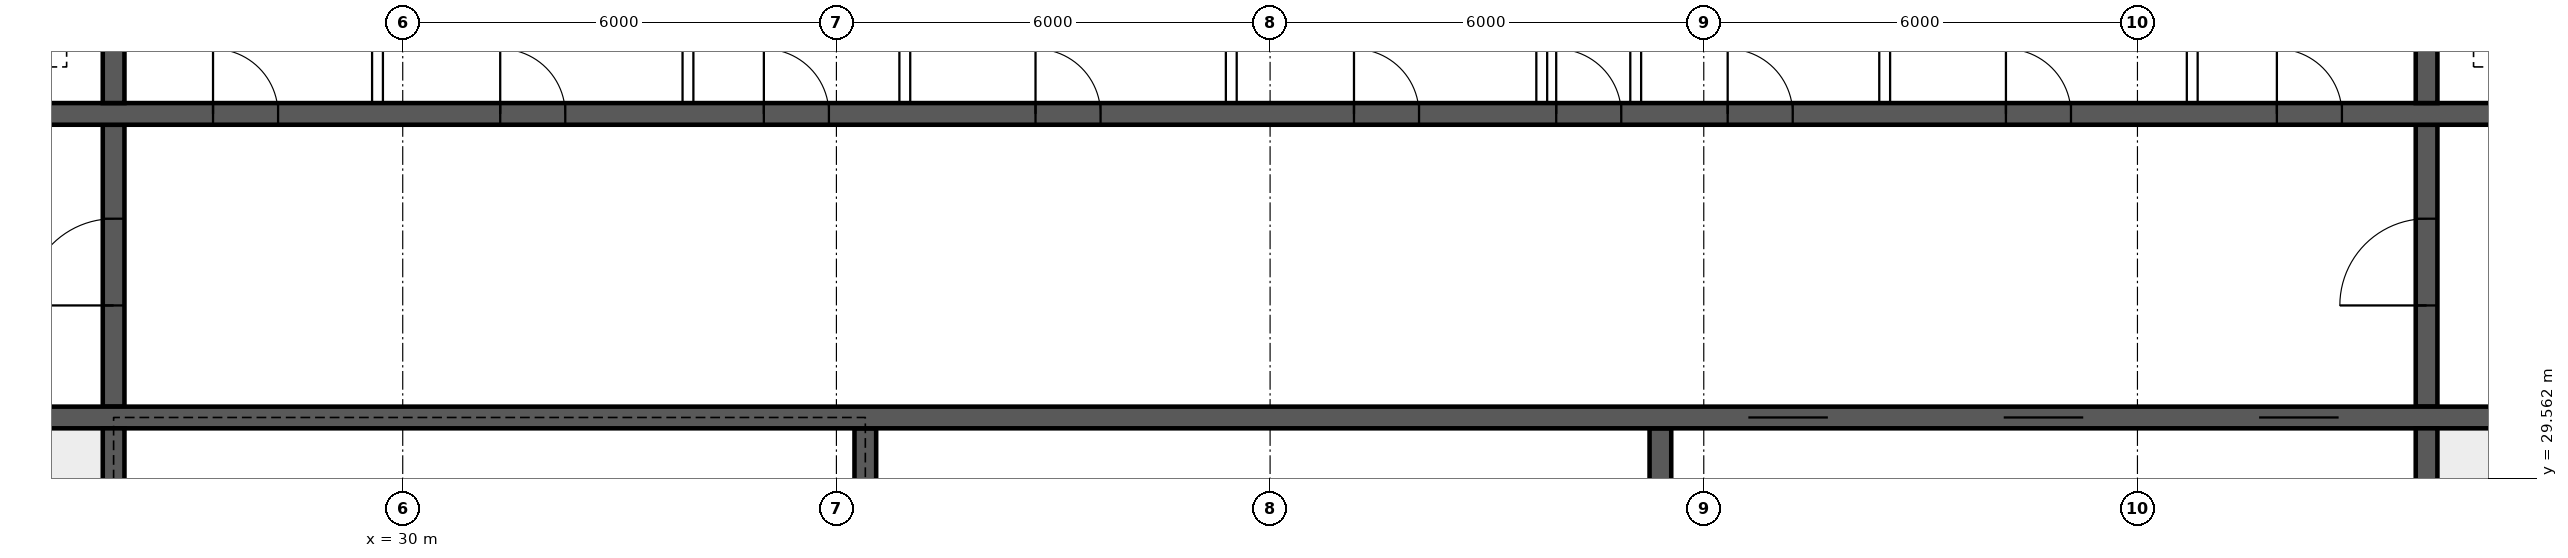
"""IFC4 building model, lengths in metres.
Left out: names, types, materials, properties, quantities, classifications, styles, units other than length and angle.
Written with IfcOpenShell. Run it as: python <this file> out.ifc"""

import sys

from ifc_helpers import new_model, si_unit, direction, frame, frame_2d, origin, place, context, subcontext, project, spatial, rectangle, extrude, element, fill, save


model = new_model("IFC4")
c1 = context("Model", 3, precision=1e-05, world=origin(), true_north=direction((0.0, 1.0)))
c2 = subcontext(c1, "Body", "Model", "MODEL_VIEW")
j1 = project(units=[si_unit("LENGTHUNIT", "METRE"), si_unit("PLANEANGLEUNIT", "RADIAN")], contexts=[c1])
p1 = place(None, origin())
s1 = spatial("IfcSite", under=j1, at=p1, CompositionType="ELEMENT")
p2 = place(p1, origin())
s2 = spatial("IfcBuilding", under=s1, at=p2, CompositionType="ELEMENT")
p3 = place(p2, frame((0.0, 0.0, 68.95)))
s3 = spatial("IfcBuildingStorey", under=s2, at=p3, CompositionType="ELEMENT", Elevation=68.95)
p4 = place(p3, frame((18.5, 30.4, 0.0), z_axis=(0.0, 0.0, 1.0), x_axis=(1.0, 0.0, 0.0)))
e1 = element("IfcWall", 1, at=p4, inside=s3, PredefinedType="SHEAR", context=c2, shape_type="SweptSolid", body=[
    extrude(rectangle(XDim=47.0, YDim=0.3, at=frame_2d((23.5, 0.0))), origin(), (0.0, 0.0, 1.0), 7.2),
])
p5 = place(p4, frame((0.4, 0.0, 0.0)))
e2 = element("IfcOpeningElement", 2, at=p5, cuts=e1, PredefinedType="OPENING", context=c2, shape_type="SweptSolid", body=[
    extrude(rectangle(XDim=1.0, YDim=2.1, at=frame_2d((0.5, 1.05))), frame((0.0, 0.16, 0.0), z_axis=(0.0, -1.0, 0.0), x_axis=(1.0, 0.0, 0.0)), (0.0, 0.0, 1.0), 0.32),
])
p6 = place(p4, frame((45.6, 0.0, 0.0)))
e3 = element("IfcOpeningElement", 3, at=p6, cuts=e1, PredefinedType="OPENING", context=c2, shape_type="SweptSolid", body=[
    extrude(rectangle(XDim=1.0, YDim=2.1, at=frame_2d((0.5, 1.05))), frame((0.0, 0.16, 0.0), z_axis=(0.0, -1.0, 0.0), x_axis=(1.0, 0.0, 0.0)), (0.0, 0.0, 1.0), 0.32),
])
p7 = place(p4, frame((30.117, 0.0, 0.0)))
e4 = element("IfcOpeningElement", 4, at=p7, cuts=e1, PredefinedType="OPENING", context=c2, shape_type="SweptSolid", body=[
    extrude(rectangle(XDim=1.1, YDim=2.1, at=frame_2d((0.55, 1.05))), frame((0.0, 0.16, 0.0), z_axis=(0.0, -1.0, 0.0), x_axis=(1.0, 0.0, 0.0)), (0.0, 0.0, 1.0), 0.32),
])
p8 = place(p4, frame((33.65, 0.0, 0.0)))
e5 = element("IfcOpeningElement", 5, at=p8, cuts=e1, PredefinedType="OPENING", context=c2, shape_type="SweptSolid", body=[
    extrude(rectangle(XDim=1.1, YDim=2.1, at=frame_2d((0.55, 1.05))), frame((0.0, 0.16, 0.0), z_axis=(0.0, -1.0, 0.0), x_axis=(1.0, 0.0, 0.0)), (0.0, 0.0, 1.0), 0.32),
])
p9 = place(p4, frame((37.183, 0.0, 0.0)))
e6 = element("IfcOpeningElement", 6, at=p9, cuts=e1, PredefinedType="OPENING", context=c2, shape_type="SweptSolid", body=[
    extrude(rectangle(XDim=1.1, YDim=2.1, at=frame_2d((0.55, 1.05))), frame((0.0, 0.16, 0.0), z_axis=(0.0, -1.0, 0.0), x_axis=(1.0, 0.0, 0.0)), (0.0, 0.0, 1.0), 0.32),
])
p10 = place(p3, frame((18.5, 34.6, 0.0), z_axis=(0.0, 0.0, 1.0), x_axis=(1.0, 0.0, 0.0)))
e7 = element("IfcWall", 7, at=p10, inside=s3, PredefinedType="SHEAR", context=c2, shape_type="SweptSolid", body=[
    extrude(rectangle(XDim=47.0, YDim=0.3, at=frame_2d((23.5, 0.0))), origin(), (0.0, 0.0, 1.0), 7.2),
])
p11 = place(p10, frame((0.9, 0.0, 0.0)))
e8 = element("IfcOpeningElement", 8, at=p11, cuts=e7, PredefinedType="OPENING", context=c2, shape_type="SweptSolid", body=[
    extrude(rectangle(XDim=1.1, YDim=2.1, at=frame_2d((0.55, 1.05))), frame((0.0, 0.16, 0.0), z_axis=(0.0, -1.0, 0.0), x_axis=(1.0, 0.0, 0.0)), (0.0, 0.0, 1.0), 0.32),
])
p12 = place(p10, frame((45.0, 0.0, 0.0)))
e9 = element("IfcOpeningElement", 9, at=p12, cuts=e7, PredefinedType="OPENING", context=c2, shape_type="SweptSolid", body=[
    extrude(rectangle(XDim=1.1, YDim=2.1, at=frame_2d((0.55, 1.05))), frame((0.0, 0.16, 0.0), z_axis=(0.0, -1.0, 0.0), x_axis=(1.0, 0.0, 0.0)), (0.0, 0.0, 1.0), 0.32),
])
p13 = place(p10, frame((4.1, 0.0, 0.0)))
e10 = element("IfcOpeningElement", 10, at=p13, cuts=e7, PredefinedType="OPENING", context=c2, shape_type="SweptSolid", body=[
    extrude(rectangle(XDim=0.9, YDim=2.1, at=frame_2d((0.45, 1.05))), frame((0.0, 0.16, 0.0), z_axis=(0.0, -1.0, 0.0), x_axis=(1.0, 0.0, 0.0)), (0.0, 0.0, 1.0), 0.32),
])
p14 = place(p10, frame((42.0, 0.0, 0.0)))
e11 = element("IfcOpeningElement", 11, at=p14, cuts=e7, PredefinedType="OPENING", context=c2, shape_type="SweptSolid", body=[
    extrude(rectangle(XDim=0.9, YDim=2.1, at=frame_2d((0.45, 1.05))), frame((0.0, 0.16, 0.0), z_axis=(0.0, -1.0, 0.0), x_axis=(1.0, 0.0, 0.0)), (0.0, 0.0, 1.0), 0.32),
])
p15 = place(p10, frame((8.875, 0.0, 0.0)))
e12 = element("IfcOpeningElement", 12, at=p15, cuts=e7, PredefinedType="OPENING", context=c2, shape_type="SweptSolid", body=[
    extrude(rectangle(XDim=0.9, YDim=2.1, at=frame_2d((0.45, 1.05))), frame((0.0, 0.16, 0.0), z_axis=(0.0, -1.0, 0.0), x_axis=(1.0, 0.0, 0.0)), (0.0, 0.0, 1.0), 0.32),
])
p16 = place(p10, frame((12.849, 0.0, 0.0)))
e13 = element("IfcOpeningElement", 13, at=p16, cuts=e7, PredefinedType="OPENING", context=c2, shape_type="SweptSolid", body=[
    extrude(rectangle(XDim=0.9, YDim=2.1, at=frame_2d((0.45, 1.05))), frame((0.0, 0.16, 0.0), z_axis=(0.0, -1.0, 0.0), x_axis=(1.0, 0.0, 0.0)), (0.0, 0.0, 1.0), 0.32),
])
p17 = place(p10, frame((16.496, 0.0, 0.0)))
e14 = element("IfcOpeningElement", 14, at=p17, cuts=e7, PredefinedType="OPENING", context=c2, shape_type="SweptSolid", body=[
    extrude(rectangle(XDim=0.9, YDim=2.1, at=frame_2d((0.45, 1.05))), frame((0.0, 0.16, 0.0), z_axis=(0.0, -1.0, 0.0), x_axis=(1.0, 0.0, 0.0)), (0.0, 0.0, 1.0), 0.32),
])
p18 = place(p10, frame((20.255, 0.0, 0.0)))
e15 = element("IfcOpeningElement", 15, at=p18, cuts=e7, PredefinedType="OPENING", context=c2, shape_type="SweptSolid", body=[
    extrude(rectangle(XDim=0.9, YDim=2.1, at=frame_2d((0.45, 1.05))), frame((0.0, 0.16, 0.0), z_axis=(0.0, -1.0, 0.0), x_axis=(1.0, 0.0, 0.0)), (0.0, 0.0, 1.0), 0.32),
])
p19 = place(p10, frame((24.661, 0.0, 0.0)))
e16 = element("IfcOpeningElement", 16, at=p19, cuts=e7, PredefinedType="OPENING", context=c2, shape_type="SweptSolid", body=[
    extrude(rectangle(XDim=0.9, YDim=2.1, at=frame_2d((0.45, 1.05))), frame((0.0, 0.16, 0.0), z_axis=(0.0, -1.0, 0.0), x_axis=(1.0, 0.0, 0.0)), (0.0, 0.0, 1.0), 0.32),
])
p20 = place(p10, frame((27.458, 0.0, 0.0)))
e17 = element("IfcOpeningElement", 17, at=p20, cuts=e7, PredefinedType="OPENING", context=c2, shape_type="SweptSolid", body=[
    extrude(rectangle(XDim=0.9, YDim=2.1, at=frame_2d((0.45, 1.05))), frame((0.0, 0.16, 0.0), z_axis=(0.0, -1.0, 0.0), x_axis=(1.0, 0.0, 0.0)), (0.0, 0.0, 1.0), 0.32),
])
p21 = place(p10, frame((29.831, 0.0, 0.0)))
e18 = element("IfcOpeningElement", 18, at=p21, cuts=e7, PredefinedType="OPENING", context=c2, shape_type="SweptSolid", body=[
    extrude(rectangle(XDim=0.9, YDim=2.1, at=frame_2d((0.45, 1.05))), frame((0.0, 0.16, 0.0), z_axis=(0.0, -1.0, 0.0), x_axis=(1.0, 0.0, 0.0)), (0.0, 0.0, 1.0), 0.32),
])
p22 = place(p10, frame((33.68, 0.0, 0.0)))
e19 = element("IfcOpeningElement", 19, at=p22, cuts=e7, PredefinedType="OPENING", context=c2, shape_type="SweptSolid", body=[
    extrude(rectangle(XDim=0.9, YDim=2.1, at=frame_2d((0.45, 1.05))), frame((0.0, 0.16, 0.0), z_axis=(0.0, -1.0, 0.0), x_axis=(1.0, 0.0, 0.0)), (0.0, 0.0, 1.0), 0.32),
])
p23 = place(p10, frame((37.429, 0.0, 0.0)))
e20 = element("IfcOpeningElement", 20, at=p23, cuts=e7, PredefinedType="OPENING", context=c2, shape_type="SweptSolid", body=[
    extrude(rectangle(XDim=0.9, YDim=2.1, at=frame_2d((0.45, 1.05))), frame((0.0, 0.16, 0.0), z_axis=(0.0, -1.0, 0.0), x_axis=(1.0, 0.0, 0.0)), (0.0, 0.0, 1.0), 0.32),
])
for number, where, z_axis, x_axis in (
    (21, (26.0, 26.3, 0.0), (0.0, 0.0, 1.0), (0.0, 1.0, 0.0)),
    (22, (58.0, 26.3, 0.0), (0.0, 0.0, 1.0), (0.0, 1.0, 0.0)),
):
    element("IfcWall", number, at=place(p3, frame(where, z_axis=z_axis, x_axis=x_axis)), inside=s3, PredefinedType="SHEAR", context=c2, shape_type="SweptSolid", body=[
        extrude(rectangle(XDim=3.95, YDim=0.3, at=frame_2d((1.975, 0.0))), origin(), (0.0, 0.0, 1.0), 7.2),
    ])
p24 = place(p3, frame((26.0, 30.55, 0.0), z_axis=(0.0, 0.0, 1.0), x_axis=(0.0, 1.0, 0.0)))
e23 = element("IfcWall", 23, at=p24, inside=s3, PredefinedType="SHEAR", context=c2, shape_type="SweptSolid", body=[
    extrude(rectangle(XDim=3.9, YDim=0.3, at=frame_2d((1.95, 0.0))), origin(), (0.0, 0.0, 1.0), 7.2),
])
p25 = place(p24, frame((1.4, 0.0, 0.0)))
e24 = element("IfcOpeningElement", 24, at=p25, cuts=e23, PredefinedType="OPENING", context=c2, shape_type="SweptSolid", body=[
    extrude(rectangle(XDim=1.2, YDim=2.1, at=frame_2d((0.6, 1.05))), frame((0.0, 0.16, 0.0), z_axis=(0.0, -1.0, 0.0), x_axis=(1.0, 0.0, 0.0)), (0.0, 0.0, 1.0), 0.32),
])
p26 = place(p3, frame((58.0, 30.55, 0.0), z_axis=(0.0, 0.0, 1.0), x_axis=(0.0, 1.0, 0.0)))
e25 = element("IfcWall", 25, at=p26, inside=s3, PredefinedType="SHEAR", context=c2, shape_type="SweptSolid", body=[
    extrude(rectangle(XDim=3.9, YDim=0.3, at=frame_2d((1.95, 0.0))), origin(), (0.0, 0.0, 1.0), 7.2),
])
p27 = place(p26, frame((1.4, 0.0, 0.0)))
e26 = element("IfcOpeningElement", 26, at=p27, cuts=e25, PredefinedType="OPENING", context=c2, shape_type="SweptSolid", body=[
    extrude(rectangle(XDim=1.2, YDim=2.1, at=frame_2d((0.6, 1.05))), frame((0.0, 0.16, 0.0), z_axis=(0.0, -1.0, 0.0), x_axis=(1.0, 0.0, 0.0)), (0.0, 0.0, 1.0), 0.32),
])
for number, where, z_axis, x_axis in (
    (27, (26.0, 34.75, 0.0), (0.0, 0.0, 1.0), (0.0, 1.0, 0.0)),
    (28, (58.0, 34.75, 0.0), (0.0, 0.0, 1.0), (0.0, 1.0, 0.0)),
):
    element("IfcWall", number, at=place(p3, frame(where, z_axis=z_axis, x_axis=x_axis)), inside=s3, PredefinedType="SHEAR", context=c2, shape_type="SweptSolid", body=[
        extrude(rectangle(XDim=2.95, YDim=0.3, at=frame_2d((1.475, 0.0))), origin(), (0.0, 0.0, 1.0), 7.2),
    ])
for number, where, z_axis, x_axis in (
    (29, (36.4, 26.3, 0.0), (0.0, 0.0, 1.0), (0.0, 1.0, 0.0)),
    (30, (47.4, 26.3, 0.0), (0.0, 0.0, 1.0), (0.0, 1.0, 0.0)),
):
    element("IfcWall", number, at=place(p3, frame(where, z_axis=z_axis, x_axis=x_axis)), inside=s3, PredefinedType="SHEAR", context=c2, shape_type="SweptSolid", body=[
        extrude(rectangle(XDim=3.95, YDim=0.3, at=frame_2d((1.975, 0.0))), origin(), (0.0, 0.0, 1.0), 7.2),
    ])
for number, where, z_axis, x_axis in (
    (31, (29.651, 34.75, 0.0), (0.0, 0.0, 1.0), (0.0, 1.0, 0.0)),
    (32, (33.946, 34.75, 0.0), (0.0, 0.0, 1.0), (0.0, 1.0, 0.0)),
    (33, (36.946, 34.75, 0.0), (0.0, 0.0, 1.0), (0.0, 1.0, 0.0)),
    (34, (41.463, 34.75, 0.0), (0.0, 0.0, 1.0), (0.0, 1.0, 0.0)),
    (35, (45.758, 34.75, 0.0), (0.0, 0.0, 1.0), (0.0, 1.0, 0.0)),
    (36, (47.058, 34.75, 0.0), (0.0, 0.0, 1.0), (0.0, 1.0, 0.0)),
    (37, (50.503, 34.75, 0.0), (0.0, 0.0, 1.0), (0.0, 1.0, 0.0)),
    (38, (54.758, 34.75, 0.0), (0.0, 0.0, 1.0), (0.0, 1.0, 0.0)),
):
    element("IfcWall", number, at=place(p3, frame(where, z_axis=z_axis, x_axis=x_axis)), inside=s3, PredefinedType="SOLIDWALL", context=c2, shape_type="SweptSolid", body=[
        extrude(rectangle(XDim=2.95, YDim=0.15, at=frame_2d((1.475, 0.0))), origin(), (0.0, 0.0, 1.0), 6.9),
    ])
p28 = place(p25, origin())
e39 = element("IfcDoor", 39, at=p28, inside=s3, OperationType="SINGLE_SWING_LEFT", PredefinedType="DOOR", context=c2, shape_type="SweptSolid", body=[
    extrude(rectangle(XDim=1.2, YDim=2.1, at=frame_2d((0.6, 1.05))), frame((0.0, 0.025, 0.0), z_axis=(0.0, -1.0, 0.0), x_axis=(1.0, 0.0, 0.0)), (0.0, 0.0, 1.0), 0.05),
])
fill(e24, e39)
p29 = place(p27, origin())
e40 = element("IfcDoor", 40, at=p29, inside=s3, OperationType="SINGLE_SWING_LEFT", PredefinedType="DOOR", context=c2, shape_type="SweptSolid", body=[
    extrude(rectangle(XDim=1.2, YDim=2.1, at=frame_2d((0.6, 1.05))), frame((0.0, 0.025, 0.0), z_axis=(0.0, -1.0, 0.0), x_axis=(1.0, 0.0, 0.0)), (0.0, 0.0, 1.0), 0.05),
])
fill(e26, e40)
p30 = place(p15, origin())
e41 = element("IfcDoor", 41, at=p30, inside=s3, OperationType="SINGLE_SWING_LEFT", PredefinedType="DOOR", context=c2, shape_type="SweptSolid", body=[
    extrude(rectangle(XDim=0.9, YDim=2.1, at=frame_2d((0.45, 1.05))), frame((0.0, 0.025, 0.0), z_axis=(0.0, -1.0, 0.0), x_axis=(1.0, 0.0, 0.0)), (0.0, 0.0, 1.0), 0.05),
])
fill(e12, e41)
p31 = place(p16, origin())
e42 = element("IfcDoor", 42, at=p31, inside=s3, OperationType="SINGLE_SWING_LEFT", PredefinedType="DOOR", context=c2, shape_type="SweptSolid", body=[
    extrude(rectangle(XDim=0.9, YDim=2.1, at=frame_2d((0.45, 1.05))), frame((0.0, 0.025, 0.0), z_axis=(0.0, -1.0, 0.0), x_axis=(1.0, 0.0, 0.0)), (0.0, 0.0, 1.0), 0.05),
])
fill(e13, e42)
p32 = place(p17, origin())
e43 = element("IfcDoor", 43, at=p32, inside=s3, OperationType="SINGLE_SWING_LEFT", PredefinedType="DOOR", context=c2, shape_type="SweptSolid", body=[
    extrude(rectangle(XDim=0.9, YDim=2.1, at=frame_2d((0.45, 1.05))), frame((0.0, 0.025, 0.0), z_axis=(0.0, -1.0, 0.0), x_axis=(1.0, 0.0, 0.0)), (0.0, 0.0, 1.0), 0.05),
])
fill(e14, e43)
p33 = place(p18, origin())
e44 = element("IfcDoor", 44, at=p33, inside=s3, OperationType="SINGLE_SWING_LEFT", PredefinedType="DOOR", context=c2, shape_type="SweptSolid", body=[
    extrude(rectangle(XDim=0.9, YDim=2.1, at=frame_2d((0.45, 1.05))), frame((0.0, 0.025, 0.0), z_axis=(0.0, -1.0, 0.0), x_axis=(1.0, 0.0, 0.0)), (0.0, 0.0, 1.0), 0.05),
])
fill(e15, e44)
p34 = place(p19, origin())
e45 = element("IfcDoor", 45, at=p34, inside=s3, OperationType="SINGLE_SWING_LEFT", PredefinedType="DOOR", context=c2, shape_type="SweptSolid", body=[
    extrude(rectangle(XDim=0.9, YDim=2.1, at=frame_2d((0.45, 1.05))), frame((0.0, 0.025, 0.0), z_axis=(0.0, -1.0, 0.0), x_axis=(1.0, 0.0, 0.0)), (0.0, 0.0, 1.0), 0.05),
])
fill(e16, e45)
p35 = place(p20, origin())
e46 = element("IfcDoor", 46, at=p35, inside=s3, OperationType="SINGLE_SWING_LEFT", PredefinedType="DOOR", context=c2, shape_type="SweptSolid", body=[
    extrude(rectangle(XDim=0.9, YDim=2.1, at=frame_2d((0.45, 1.05))), frame((0.0, 0.025, 0.0), z_axis=(0.0, -1.0, 0.0), x_axis=(1.0, 0.0, 0.0)), (0.0, 0.0, 1.0), 0.05),
])
fill(e17, e46)
p36 = place(p21, origin())
e47 = element("IfcDoor", 47, at=p36, inside=s3, OperationType="SINGLE_SWING_LEFT", PredefinedType="DOOR", context=c2, shape_type="SweptSolid", body=[
    extrude(rectangle(XDim=0.9, YDim=2.1, at=frame_2d((0.45, 1.05))), frame((0.0, 0.025, 0.0), z_axis=(0.0, -1.0, 0.0), x_axis=(1.0, 0.0, 0.0)), (0.0, 0.0, 1.0), 0.05),
])
fill(e18, e47)
p37 = place(p22, origin())
e48 = element("IfcDoor", 48, at=p37, inside=s3, OperationType="SINGLE_SWING_LEFT", PredefinedType="DOOR", context=c2, shape_type="SweptSolid", body=[
    extrude(rectangle(XDim=0.9, YDim=2.1, at=frame_2d((0.45, 1.05))), frame((0.0, 0.025, 0.0), z_axis=(0.0, -1.0, 0.0), x_axis=(1.0, 0.0, 0.0)), (0.0, 0.0, 1.0), 0.05),
])
fill(e19, e48)
p38 = place(p23, origin())
e49 = element("IfcDoor", 49, at=p38, inside=s3, OperationType="SINGLE_SWING_LEFT", PredefinedType="DOOR", context=c2, shape_type="SweptSolid", body=[
    extrude(rectangle(XDim=0.9, YDim=2.1, at=frame_2d((0.45, 1.05))), frame((0.0, 0.025, 0.0), z_axis=(0.0, -1.0, 0.0), x_axis=(1.0, 0.0, 0.0)), (0.0, 0.0, 1.0), 0.05),
])
fill(e20, e49)
p39 = place(p7, origin())
e50 = element("IfcDoor", 50, at=p39, inside=s3, OperationType="DOUBLE_DOOR_SLIDING", PredefinedType="DOOR", context=c2, shape_type="SweptSolid", body=[
    extrude(rectangle(XDim=1.1, YDim=2.1, at=frame_2d((0.55, 1.05))), frame((0.0, 0.025, 0.0), z_axis=(0.0, -1.0, 0.0), x_axis=(1.0, 0.0, 0.0)), (0.0, 0.0, 1.0), 0.05),
])
fill(e4, e50)
p40 = place(p8, origin())
e51 = element("IfcDoor", 51, at=p40, inside=s3, OperationType="DOUBLE_DOOR_SLIDING", PredefinedType="DOOR", context=c2, shape_type="SweptSolid", body=[
    extrude(rectangle(XDim=1.1, YDim=2.1, at=frame_2d((0.55, 1.05))), frame((0.0, 0.025, 0.0), z_axis=(0.0, -1.0, 0.0), x_axis=(1.0, 0.0, 0.0)), (0.0, 0.0, 1.0), 0.05),
])
fill(e5, e51)
p41 = place(p9, origin())
e52 = element("IfcDoor", 52, at=p41, inside=s3, OperationType="DOUBLE_DOOR_SLIDING", PredefinedType="DOOR", context=c2, shape_type="SweptSolid", body=[
    extrude(rectangle(XDim=1.1, YDim=2.1, at=frame_2d((0.55, 1.05))), frame((0.0, 0.025, 0.0), z_axis=(0.0, -1.0, 0.0), x_axis=(1.0, 0.0, 0.0)), (0.0, 0.0, 1.0), 0.05),
])
fill(e6, e52)
save(model, sys.argv[1])
